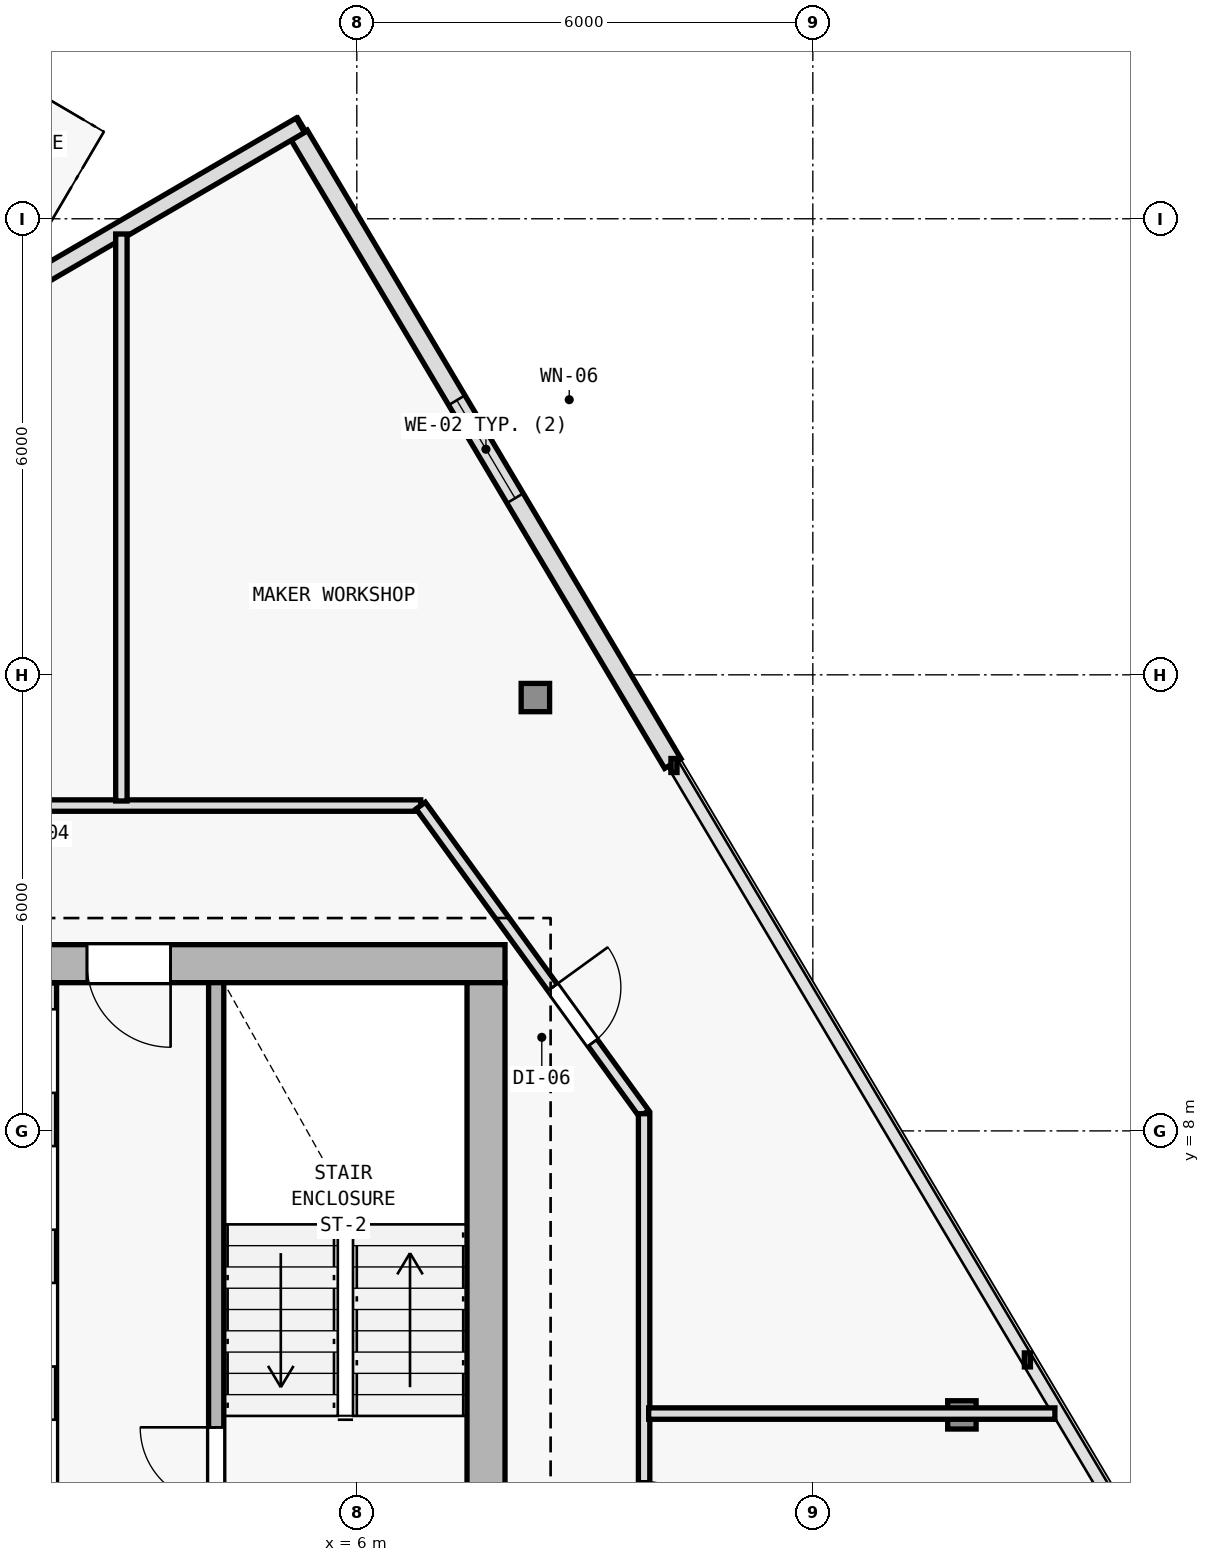
"""IFC4 building model, lengths in metres.
Left out: names, types, materials, properties, quantities, classifications, styles, units other than length and angle.
Written with IfcOpenShell. Run it as: python <this file> out.ifc"""

import sys

from ifc_helpers import new_model, si_unit, direction, frame, frame_2d, origin, origin_2d, place, context, subcontext, project, spatial, rectangle, i_section, extrude, element, fill, save


model = new_model("IFC4")
c1 = context("Model", 3, precision=1e-05, world=origin(), true_north=direction((0.0, 1.0)))
c2 = subcontext(c1, "Body", "Model", "MODEL_VIEW")
j1 = project(units=[si_unit("LENGTHUNIT", "METRE"), si_unit("PLANEANGLEUNIT", "RADIAN")], contexts=[c1])
p1 = place(None, origin())
s1 = spatial("IfcSite", under=j1, at=p1, CompositionType="ELEMENT")
p2 = place(p1, origin())
s2 = spatial("IfcBuilding", under=s1, at=p2, CompositionType="ELEMENT")
p3 = place(p2, frame((0.0, 0.0, 250.8)))
s3 = spatial("IfcBuildingStorey", under=s2, at=p3, CompositionType="ELEMENT", Elevation=250.8)
p4 = place(p3, frame((7.7, 10.2, 0.0), z_axis=(0.0, 0.0, 1.0), x_axis=(1.0, 0.0, 0.0)))
e1 = element("IfcColumn", 1, at=p4, inside=s3, PredefinedType="COLUMN", context=c2, shape_type="SweptSolid", body=[
    extrude(i_section(OverallWidth=0.374, OverallDepth=0.372, WebThickness=0.012, FlangeThickness=0.02, FilletRadius=0.015, at=origin_2d()), origin(), (0.0, 0.0, 1.0), 3.6),
])
p5 = place(p3, frame((13.961, 4.264, 0.005), z_axis=(-0.018906028715, 0.009589028952, 0.999775281052), x_axis=(-0.452339157861, -0.891845999187, 0.0)))
e2 = element("IfcColumn", 2, at=p5, inside=s3, PredefinedType="COLUMN", context=c2, shape_type="SweptSolid", body=[
    extrude(i_section(OverallWidth=0.374, OverallDepth=0.372, WebThickness=0.012, FlangeThickness=0.02, FilletRadius=0.015, at=origin_2d()), origin(), (0.0, 0.0, 1.0), 3.59),
])
p6 = place(p3, frame((8.35, 13.701, 0.005), z_axis=(-0.011699046613, -0.002516655376, 0.999928396814), x_axis=(0.210305364179, -0.977635746993, 0.0)))
e3 = element("IfcColumn", 3, at=p6, inside=s3, PredefinedType="COLUMN", context=c2, shape_type="SweptSolid", body=[
    extrude(i_section(OverallWidth=0.374, OverallDepth=0.372, WebThickness=0.012, FlangeThickness=0.02, FilletRadius=0.015, at=origin_2d()), origin(), (0.0, 0.0, 1.0), 3.589),
])
p7 = place(p3, frame((5.24, 21.103, 0.0), z_axis=(0.0, 0.0, 1.0), x_axis=(0.511088566076, -0.859528055171, 0.0)))
e4 = element("IfcWall", 4, at=p7, inside=s3, PredefinedType="SOLIDWALL", context=c2, shape_type="SweptSolid", body=[
    extrude(rectangle(XDim=9.622, YDim=0.25, at=frame_2d((4.811, 0.0))), origin(), (0.0, 0.0, 1.0), 3.35),
])
p8 = place(p7, frame((4.061, 0.0, 0.62)))
e5 = element("IfcOpeningElement", 5, at=p8, cuts=e4, PredefinedType="OPENING", context=c2, shape_type="SweptSolid", body=[
    extrude(rectangle(XDim=1.5, YDim=2.0, at=frame_2d((0.75, 1.0))), frame((0.0, 0.135, 0.0), z_axis=(0.0, -1.0, 0.0), x_axis=(1.0, 0.0, 0.0)), (0.0, 0.0, 1.0), 0.27),
])
p9 = place(p3, frame((1.832, 19.234, 0.0), z_axis=(0.0, 0.0, 1.0), x_axis=(0.86397765749, 0.503530145432, 0.0)))
e6 = element("IfcWall", 6, at=p9, inside=s3, PredefinedType="SOLIDWALL", context=c2, shape_type="SweptSolid", body=[
    extrude(rectangle(XDim=3.964, YDim=0.22, at=frame_2d((1.982, 0.0))), origin(), (0.0, 0.0, 1.0), 3.35),
])
p10 = place(p3, frame((7.95, 10.2, 0.0), z_axis=(0.0, 0.0, 1.0), x_axis=(-1.0, 0.0, 0.0)))
e7 = element("IfcWall", 7, at=p10, inside=s3, PredefinedType="SHEAR", context=c2, shape_type="SweptSolid", body=[
    extrude(rectangle(XDim=15.9, YDim=0.5, at=frame_2d((7.95, 0.0))), origin(), (0.0, 0.0, 1.0), 3.35),
])
p11 = place(p10, frame((4.4, 0.0, 0.0)))
e8 = element("IfcOpeningElement", 8, at=p11, cuts=e7, PredefinedType="OPENING", context=c2, shape_type="SweptSolid", body=[
    extrude(rectangle(XDim=1.1, YDim=2.15, at=frame_2d((0.55, 1.075))), frame((0.0, 0.26, 0.0), z_axis=(0.0, -1.0, 0.0), x_axis=(1.0, 0.0, 0.0)), (0.0, 0.0, 1.0), 0.52),
])
p12 = place(p3, frame((7.7, 9.95, 0.0), z_axis=(0.0, 0.0, 1.0), x_axis=(0.0, -1.0, 0.0)))
e9 = element("IfcWall", 9, at=p12, inside=s3, PredefinedType="SHEAR", context=c2, shape_type="SweptSolid", body=[
    extrude(rectangle(XDim=19.1, YDim=0.5, at=frame_2d((9.55, 0.0))), origin(), (0.0, 0.0, 1.0), 3.35),
])
p13 = place(p3, frame((4.15, 2.75, 0.0), z_axis=(0.0, 0.0, 1.0), x_axis=(0.0, 1.0, 0.0)))
e10 = element("IfcWall", 10, at=p13, inside=s3, PredefinedType="SOLIDWALL", context=c2, shape_type="SweptSolid", body=[
    extrude(rectangle(XDim=7.2, YDim=0.2, at=frame_2d((3.6, 0.0))), origin(), (0.0, 0.0, 1.0), 3.35),
])
p14 = place(p13, frame((0.35, 0.0, 0.0)))
e11 = element("IfcOpeningElement", 11, at=p14, cuts=e10, PredefinedType="OPENING", context=c2, shape_type="SweptSolid", body=[
    extrude(rectangle(XDim=1.0, YDim=2.15, at=frame_2d((0.5, 1.075))), frame((0.0, 0.11, 0.0), z_axis=(0.0, -1.0, 0.0), x_axis=(1.0, 0.0, 0.0)), (0.0, 0.0, 1.0), 0.22),
])
p15 = place(p3, frame((1.95, 2.65, 0.0), z_axis=(0.0, 0.0, 1.0), x_axis=(0.0, 1.0, 0.0)))
e12 = element("IfcWall", 12, at=p15, inside=s3, PredefinedType="SOLIDWALL", context=c2, shape_type="SweptSolid", body=[
    extrude(rectangle(XDim=7.295, YDim=0.2, at=frame_2d((3.647, 0.0))), origin(), (0.0, 0.0, 1.0), 3.35),
])
p16 = place(p15, frame((0.45, 0.0, 0.0)))
e13 = element("IfcOpeningElement", 13, at=p16, cuts=e12, PredefinedType="OPENING", context=c2, shape_type="SweptSolid", body=[
    extrude(rectangle(XDim=1.1, YDim=2.15, at=frame_2d((0.55, 1.075))), frame((0.0, 0.11, 0.0), z_axis=(0.0, -1.0, 0.0), x_axis=(1.0, 0.0, 0.0)), (0.0, 0.0, 1.0), 0.22),
])
p17 = place(p15, frame((2.25, 0.0, 0.0)))
e14 = element("IfcOpeningElement", 14, at=p17, cuts=e12, PredefinedType="OPENING", context=c2, shape_type="SweptSolid", body=[
    extrude(rectangle(XDim=1.1, YDim=2.15, at=frame_2d((0.55, 1.075))), frame((0.0, 0.11, 0.0), z_axis=(0.0, -1.0, 0.0), x_axis=(1.0, 0.0, 0.0)), (0.0, 0.0, 1.0), 0.22),
])
p18 = place(p15, frame((4.05, 0.0, 0.0)))
e15 = element("IfcOpeningElement", 15, at=p18, cuts=e12, PredefinedType="OPENING", context=c2, shape_type="SweptSolid", body=[
    extrude(rectangle(XDim=1.1, YDim=2.15, at=frame_2d((0.55, 1.075))), frame((0.0, 0.11, 0.0), z_axis=(0.0, -1.0, 0.0), x_axis=(1.0, 0.0, 0.0)), (0.0, 0.0, 1.0), 0.22),
])
p19 = place(p15, frame((5.85, 0.0, 0.0)))
e16 = element("IfcOpeningElement", 16, at=p19, cuts=e12, PredefinedType="OPENING", context=c2, shape_type="SweptSolid", body=[
    extrude(rectangle(XDim=1.1, YDim=2.15, at=frame_2d((0.55, 1.075))), frame((0.0, 0.11, 0.0), z_axis=(0.0, -1.0, 0.0), x_axis=(1.0, 0.0, 0.0)), (0.0, 0.0, 1.0), 0.22),
])
p20 = place(p3, frame((-6.841, 12.28, 0.0), z_axis=(0.0, 0.0, 1.0), x_axis=(1.0, 0.0, 0.0)))
e17 = element("IfcWall", 17, at=p20, inside=s3, PredefinedType="PARTITIONING", context=c2, shape_type="SweptSolid", body=[
    extrude(rectangle(XDim=13.682, YDim=0.15, at=frame_2d((6.841, 0.0))), origin(), (0.0, 0.0, 1.0), 3.015),
])
p21 = place(p20, frame((4.805, 0.0, 0.0)))
e18 = element("IfcOpeningElement", 18, at=p21, cuts=e17, PredefinedType="OPENING", context=c2, shape_type="SweptSolid", body=[
    extrude(rectangle(XDim=0.9, YDim=2.1, at=frame_2d((0.45, 1.05))), frame((0.0, 0.085, 0.0), z_axis=(0.0, -1.0, 0.0), x_axis=(1.0, 0.0, 0.0)), (0.0, 0.0, 1.0), 0.17),
])
p22 = place(p3, frame((6.841, 12.28, 0.0), z_axis=(0.0, 0.0, 1.0), x_axis=(0.586956386413, -0.809618552436, 0.0)))
e19 = element("IfcWall", 19, at=p22, inside=s3, PredefinedType="PARTITIONING", context=c2, shape_type="SweptSolid", body=[
    extrude(rectangle(XDim=5.008, YDim=0.15, at=frame_2d((2.504, 0.0))), origin(), (0.0, 0.0, 1.0), 2.775),
])
p23 = place(p22, frame((2.954, 0.0, 0.0)))
e20 = element("IfcOpeningElement", 20, at=p23, cuts=e19, PredefinedType="OPENING", context=c2, shape_type="SweptSolid", body=[
    extrude(rectangle(XDim=0.9, YDim=2.1, at=frame_2d((0.45, 1.05))), frame((0.0, 0.085, 0.0), z_axis=(0.0, -1.0, 0.0), x_axis=(1.0, 0.0, 0.0)), (0.0, 0.0, 1.0), 0.17),
])
p24 = place(p3, frame((9.78, 8.226, 0.0), z_axis=(0.0, 0.0, 1.0), x_axis=(0.0, -1.0, 0.0)))
e21 = element("IfcWall", 21, at=p24, inside=s3, PredefinedType="PARTITIONING", context=c2, shape_type="SweptSolid", body=[
    extrude(rectangle(XDim=19.706, YDim=0.15, at=frame_2d((9.853, 0.0))), origin(), (0.0, 0.0, 1.0), 2.775),
])
p25 = place(p24, frame((17.451, 0.0, 0.0)))
e22 = element("IfcOpeningElement", 22, at=p25, cuts=e21, PredefinedType="OPENING", context=c2, shape_type="SweptSolid", body=[
    extrude(rectangle(XDim=0.9, YDim=2.1, at=frame_2d((0.45, 1.05))), frame((0.0, 0.085, 0.0), z_axis=(0.0, -1.0, 0.0), x_axis=(1.0, 0.0, 0.0)), (0.0, 0.0, 1.0), 0.17),
])
p26 = place(p24, frame((15.133, 0.0, 0.0)))
e23 = element("IfcOpeningElement", 23, at=p26, cuts=e21, PredefinedType="OPENING", context=c2, shape_type="SweptSolid", body=[
    extrude(rectangle(XDim=0.85, YDim=2.1, at=frame_2d((0.425, 1.05))), frame((0.0, 0.085, 0.0), z_axis=(0.0, -1.0, 0.0), x_axis=(1.0, 0.0, 0.0)), (0.0, 0.0, 1.0), 0.17),
])
p27 = place(p24, frame((13.676, 0.0, 0.0)))
e24 = element("IfcOpeningElement", 24, at=p27, cuts=e21, PredefinedType="OPENING", context=c2, shape_type="SweptSolid", body=[
    extrude(rectangle(XDim=0.85, YDim=2.1, at=frame_2d((0.425, 1.05))), frame((0.0, 0.085, 0.0), z_axis=(0.0, -1.0, 0.0), x_axis=(1.0, 0.0, 0.0)), (0.0, 0.0, 1.0), 0.17),
])
p28 = place(p24, frame((12.119, 0.0, 0.0)))
e25 = element("IfcOpeningElement", 25, at=p28, cuts=e21, PredefinedType="OPENING", context=c2, shape_type="SweptSolid", body=[
    extrude(rectangle(XDim=0.85, YDim=2.1, at=frame_2d((0.425, 1.05))), frame((0.0, 0.085, 0.0), z_axis=(0.0, -1.0, 0.0), x_axis=(1.0, 0.0, 0.0)), (0.0, 0.0, 1.0), 0.17),
])
p29 = place(p24, frame((10.022, 0.0, 0.0)))
e26 = element("IfcOpeningElement", 26, at=p29, cuts=e21, PredefinedType="OPENING", context=c2, shape_type="SweptSolid", body=[
    extrude(rectangle(XDim=0.9, YDim=2.1, at=frame_2d((0.45, 1.05))), frame((0.0, 0.085, 0.0), z_axis=(0.0, -1.0, 0.0), x_axis=(1.0, 0.0, 0.0)), (0.0, 0.0, 1.0), 0.17),
])
p30 = place(p24, frame((7.448, 0.0, 0.0)))
e27 = element("IfcOpeningElement", 27, at=p30, cuts=e21, PredefinedType="OPENING", context=c2, shape_type="SweptSolid", body=[
    extrude(rectangle(XDim=0.9, YDim=2.1, at=frame_2d((0.45, 1.05))), frame((0.0, 0.085, 0.0), z_axis=(0.0, -1.0, 0.0), x_axis=(1.0, 0.0, 0.0)), (0.0, 0.0, 1.0), 0.17),
])
p31 = place(p24, frame((4.837, 0.0, 0.0)))
e28 = element("IfcOpeningElement", 28, at=p31, cuts=e21, PredefinedType="OPENING", context=c2, shape_type="SweptSolid", body=[
    extrude(rectangle(XDim=0.9, YDim=2.1, at=frame_2d((0.45, 1.05))), frame((0.0, 0.085, 0.0), z_axis=(0.0, -1.0, 0.0), x_axis=(1.0, 0.0, 0.0)), (0.0, 0.0, 1.0), 0.17),
])
p32 = place(p3, frame((9.84, 4.281, 0.0), z_axis=(0.0, 0.0, 1.0), x_axis=(1.0, 0.0, 0.0)))
e29 = element("IfcWall", 29, at=p32, inside=s3, PredefinedType="PARTITIONING", context=c2, shape_type="SweptSolid", body=[
    extrude(rectangle(XDim=5.345, YDim=0.15, at=frame_2d((2.672, 0.0))), origin(), (0.0, 0.0, 1.0), 2.775),
])
p33 = place(p3, frame((2.903, 12.34, 0.0), z_axis=(0.0, 0.0, 1.0), x_axis=(0.0, 1.0, 0.0)))
e30 = element("IfcWall", 30, at=p33, inside=s3, PredefinedType="PARTITIONING", context=c2, shape_type="SweptSolid", body=[
    extrude(rectangle(XDim=7.46, YDim=0.15, at=frame_2d((3.73, 0.0))), origin(), (0.0, 0.0, 1.0), 3.015),
])
p34 = place(p8, origin())
e31 = element("IfcWindow", 31, at=p34, inside=s3, PartitioningType="SINGLE_PANEL", PredefinedType="WINDOW", context=c2, shape_type="SweptSolid", body=[
    extrude(rectangle(XDim=1.5, YDim=2.0, at=frame_2d((0.75, 1.0))), frame((0.0, 0.03, 0.0), z_axis=(0.0, -1.0, 0.0), x_axis=(1.0, 0.0, 0.0)), (0.0, 0.0, 1.0), 0.06),
])
fill(e5, e31)
p35 = place(p11, origin())
e32 = element("IfcDoor", 32, at=p35, inside=s3, OperationType="SINGLE_SWING_LEFT", PredefinedType="DOOR", context=c2, shape_type="SweptSolid", body=[
    extrude(rectangle(XDim=1.1, YDim=2.15, at=frame_2d((0.55, 1.075))), frame((0.0, 0.025, 0.0), z_axis=(0.0, -1.0, 0.0), x_axis=(1.0, 0.0, 0.0)), (0.0, 0.0, 1.0), 0.05),
])
fill(e8, e32)
p36 = place(p14, origin())
e33 = element("IfcDoor", 33, at=p36, inside=s3, OperationType="SINGLE_SWING_RIGHT", PredefinedType="DOOR", context=c2, shape_type="SweptSolid", body=[
    extrude(rectangle(XDim=1.0, YDim=2.15, at=frame_2d((0.5, 1.075))), frame((0.0, 0.025, 0.0), z_axis=(0.0, -1.0, 0.0), x_axis=(1.0, 0.0, 0.0)), (0.0, 0.0, 1.0), 0.05),
])
fill(e11, e33)
p37 = place(p31, origin())
e34 = element("IfcDoor", 34, at=p37, inside=s3, OperationType="SINGLE_SWING_RIGHT", PredefinedType="DOOR", context=c2, shape_type="SweptSolid", body=[
    extrude(rectangle(XDim=0.9, YDim=2.1, at=frame_2d((0.45, 1.05))), frame((0.0, 0.025, 0.0), z_axis=(0.0, -1.0, 0.0), x_axis=(1.0, 0.0, 0.0)), (0.0, 0.0, 1.0), 0.05),
])
fill(e28, e34)
p38 = place(p23, origin())
e35 = element("IfcDoor", 35, at=p38, inside=s3, OperationType="SINGLE_SWING_LEFT", PredefinedType="DOOR", context=c2, shape_type="SweptSolid", body=[
    extrude(rectangle(XDim=0.9, YDim=2.1, at=frame_2d((0.45, 1.05))), frame((0.0, 0.025, 0.0), z_axis=(0.0, -1.0, 0.0), x_axis=(1.0, 0.0, 0.0)), (0.0, 0.0, 1.0), 0.05),
])
fill(e20, e35)
save(model, sys.argv[1])
